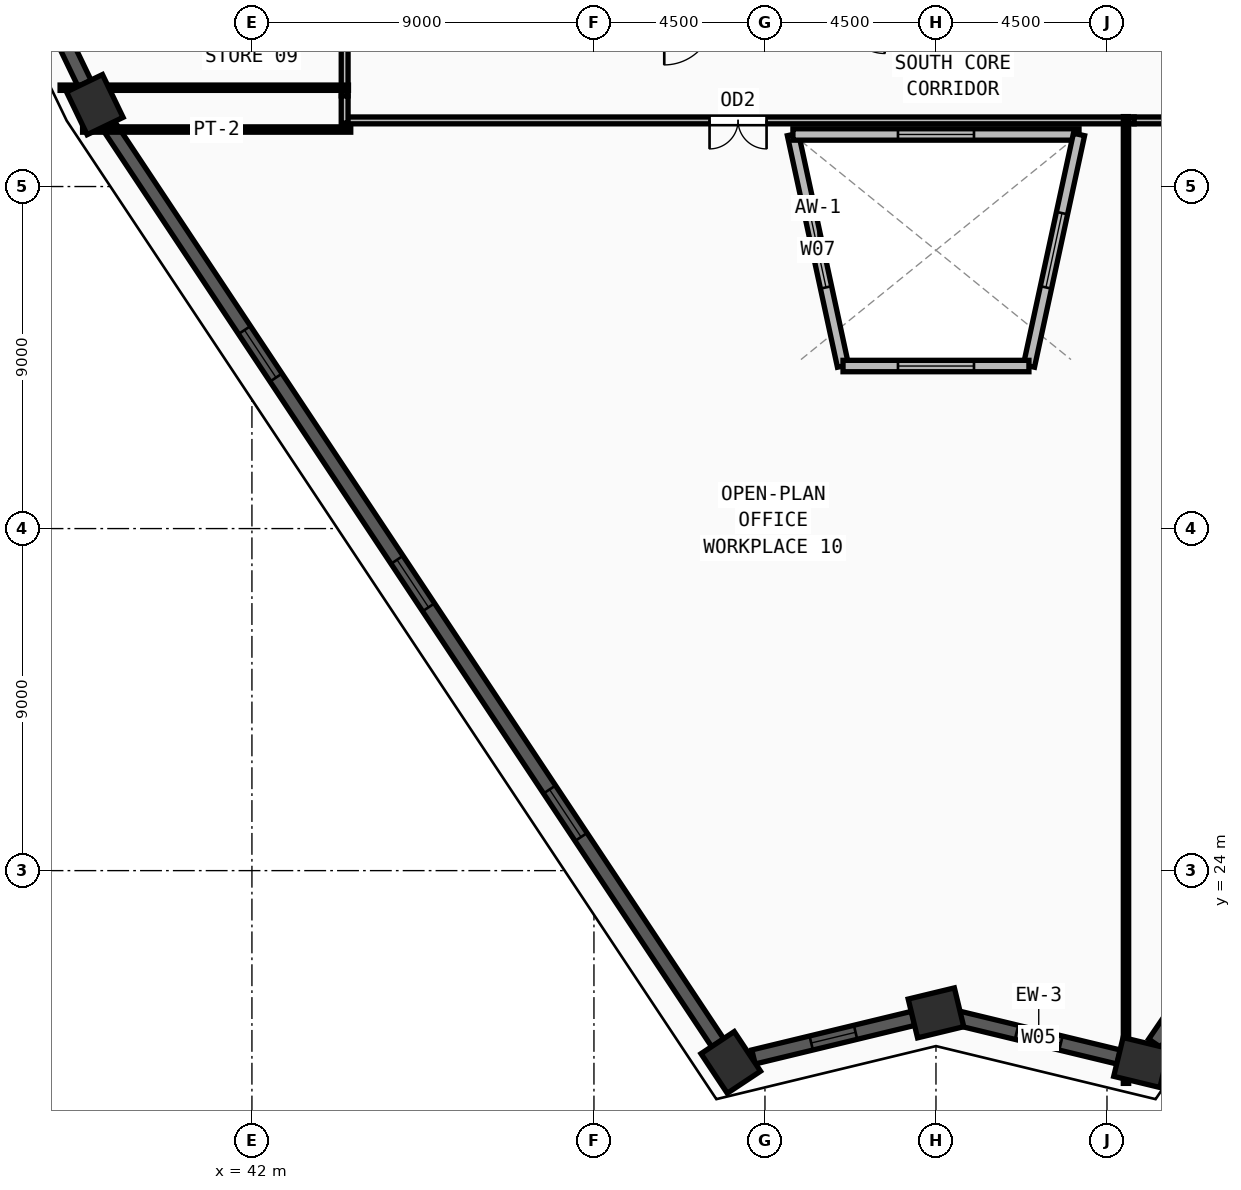
"""IFC4 building model, lengths in metres.
Left out: names, types, materials, properties, quantities, classifications, styles, units other than length and angle.
Written with IfcOpenShell. Run it as: python <this file> out.ifc"""

import sys

from ifc_helpers import new_model, si_unit, direction, frame, frame_2d, origin, origin_2d, place, context, subcontext, project, spatial, rectangle, extrude, source, transform, mapped, element, fill, save


model = new_model("IFC4")
c1 = context("Model", 3, precision=1e-05, world=origin(), true_north=direction((0.0, 1.0)))
c2 = subcontext(c1, "Body", "Model", "MODEL_VIEW")
j1 = project(units=[si_unit("LENGTHUNIT", "METRE"), si_unit("PLANEANGLEUNIT", "RADIAN")], contexts=[c1])
p1 = place(None, origin())
s1 = spatial("IfcSite", under=j1, at=p1, CompositionType="ELEMENT")
p2 = place(p1, origin())
s2 = spatial("IfcBuilding", under=s1, at=p2, CompositionType="ELEMENT")
p3 = place(p2, frame((0.0, 0.0, 224.25)))
s3 = spatial("IfcBuildingStorey", under=s2, at=p3, CompositionType="ELEMENT", Elevation=224.25)
m1 = source(origin(), c2, "Body", "SweptSolid", [
    extrude(rectangle(XDim=1.25, YDim=1.05, at=origin_2d()), origin(), (0.0, 0.0, 1.0), 3.75),
])
for number, where, z_axis, x_axis in (
    (1, (54.6, 18.953, 0.0), (0.0, 0.0, 1.0), (-0.553, 0.833, 0.0)),
    (2, (37.865, 44.155, 0.0), (0.0, 0.0, 1.0), (-0.434, 0.901, 0.0)),
    (3, (65.408, 18.951, 0.0), (0.0, 0.0, 1.0), (-0.972, 0.235, 0.0)),
    (4, (60.0, 20.257, 0.0), (0.0, 0.0, 1.0), (0.972, 0.235, 0.0)),
):
    element("IfcColumn", number, at=place(p3, frame(where, z_axis=z_axis, x_axis=x_axis)), inside=s3, PredefinedType="COLUMN", context=c2, shape_type="MappedRepresentation", body=[
        mapped(m1, transform((0.0, 0.0, 0.0), x_axis=(1.0, 0.0, 0.0), y_axis=(0.0, 1.0, 0.0), z_axis=(0.0, 0.0, 1.0), scale=1.0)),
    ])
p4 = place(p3, frame((60.598, 20.113, 0.0), z_axis=(0.0, 0.0, 1.0), x_axis=(0.972011709717, -0.234932407669, 0.0)))
e5 = element("IfcWall", 5, at=p4, inside=s3, PredefinedType="SOLIDWALL", context=c2, shape_type="SweptSolid", body=[
    extrude(rectangle(XDim=4.333, YDim=0.38, at=frame_2d((2.167, 0.0))), origin(), (0.0, 0.0, 1.0), 3.57),
])
m2 = source(origin(), c2, "Body", "SweptSolid", [
    extrude(rectangle(XDim=1.2, YDim=1.9, at=frame_2d((0.6, 0.95))), frame((0.0, 0.2, 0.0), z_axis=(0.0, -1.0, 0.0), x_axis=(1.0, 0.0, 0.0)), (0.0, 0.0, 1.0), 0.4),
])
p5 = place(p4, frame((1.567, 0.0, 0.55)))
e6 = element("IfcOpeningElement", 6, at=p5, cuts=e5, PredefinedType="OPENING", context=c2, shape_type="MappedRepresentation", body=[
    mapped(m2, transform((0.0, 0.0, 0.0), x_axis=(1.0, 0.0, 0.0), y_axis=(0.0, 1.0, 0.0), z_axis=(0.0, 0.0, 1.0), scale=1.0)),
])
p6 = place(p3, frame((65.754, 19.459, 0.0), z_axis=(0.0, 0.0, 1.0), x_axis=(0.563392494029, 0.826189383659, 0.0)))
e7 = element("IfcWall", 7, at=p6, inside=s3, PredefinedType="SOLIDWALL", context=c2, shape_type="SweptSolid", body=[
    extrude(rectangle(XDim=23.95, YDim=0.38, at=frame_2d((11.975, 0.0))), origin(), (0.0, 0.0, 1.0), 3.57),
])
m3 = source(origin(), c2, "Body", "SweptSolid", [
    extrude(rectangle(XDim=1.5, YDim=1.9, at=frame_2d((0.75, 0.95))), frame((0.0, 0.2, 0.0), z_axis=(0.0, -1.0, 0.0), x_axis=(1.0, 0.0, 0.0)), (0.0, 0.0, 1.0), 0.4),
])
p7 = place(p6, frame((5.237, 0.0, 0.55)))
e8 = element("IfcOpeningElement", 8, at=p7, cuts=e7, PredefinedType="OPENING", context=c2, shape_type="MappedRepresentation", body=[
    mapped(m3, transform((0.0, 0.0, 0.0), x_axis=(1.0, 0.0, 0.0), y_axis=(0.0, 1.0, 0.0), z_axis=(0.0, 0.0, 1.0), scale=1.0)),
])
p8 = place(p6, frame((11.225, 0.0, 0.55)))
e9 = element("IfcOpeningElement", 9, at=p8, cuts=e7, PredefinedType="OPENING", context=c2, shape_type="MappedRepresentation", body=[
    mapped(m3, transform((0.0, 0.0, 0.0), x_axis=(1.0, 0.0, 0.0), y_axis=(0.0, 1.0, 0.0), z_axis=(0.0, 0.0, 1.0), scale=1.0)),
])
p9 = place(p6, frame((17.212, 0.0, 0.55)))
e10 = element("IfcOpeningElement", 10, at=p9, cuts=e7, PredefinedType="OPENING", context=c2, shape_type="MappedRepresentation", body=[
    mapped(m3, transform((0.0, 0.0, 0.0), x_axis=(1.0, 0.0, 0.0), y_axis=(0.0, 1.0, 0.0), z_axis=(0.0, 0.0, 1.0), scale=1.0)),
])
p10 = place(p3, frame((27.211, 66.287, 0.0), z_axis=(0.0, 0.0, 1.0), x_axis=(0.433730710757, -0.901042546469, 0.0)))
e11 = element("IfcWall", 11, at=p10, inside=s3, PredefinedType="SOLIDWALL", context=c2, shape_type="SweptSolid", body=[
    extrude(rectangle(XDim=23.948, YDim=0.38, at=frame_2d((11.974, 0.0))), origin(), (0.0, 0.0, 1.0), 3.57),
])
p11 = place(p10, frame((5.237, 0.0, 0.55)))
e12 = element("IfcOpeningElement", 12, at=p11, cuts=e11, PredefinedType="OPENING", context=c2, shape_type="MappedRepresentation", body=[
    mapped(m3, transform((0.0, 0.0, 0.0), x_axis=(1.0, 0.0, 0.0), y_axis=(0.0, 1.0, 0.0), z_axis=(0.0, 0.0, 1.0), scale=1.0)),
])
p12 = place(p10, frame((11.224, 0.0, 0.55)))
e13 = element("IfcOpeningElement", 13, at=p12, cuts=e11, PredefinedType="OPENING", context=c2, shape_type="MappedRepresentation", body=[
    mapped(m3, transform((0.0, 0.0, 0.0), x_axis=(1.0, 0.0, 0.0), y_axis=(0.0, 1.0, 0.0), z_axis=(0.0, 0.0, 1.0), scale=1.0)),
])
p13 = place(p10, frame((15.011, 0.0, 0.55)))
e14 = element("IfcOpeningElement", 14, at=p13, cuts=e11, PredefinedType="OPENING", context=c2, shape_type="MappedRepresentation", body=[
    mapped(m3, transform((0.0, 0.0, 0.0), x_axis=(1.0, 0.0, 0.0), y_axis=(0.0, 1.0, 0.0), z_axis=(0.0, 0.0, 1.0), scale=1.0)),
])
p14 = place(p3, frame((38.205, 43.643, 0.0), z_axis=(0.0, 0.0, 1.0), x_axis=(0.553179293126, -0.83306222436, 0.0)))
e15 = element("IfcWall", 15, at=p14, inside=s3, PredefinedType="SOLIDWALL", context=c2, shape_type="SweptSolid", body=[
    extrude(rectangle(XDim=29.023, YDim=0.38, at=frame_2d((14.511, 0.0))), origin(), (0.0, 0.0, 1.0), 3.57),
])
p15 = place(p14, frame((6.506, 0.0, 0.55)))
e16 = element("IfcOpeningElement", 16, at=p15, cuts=e15, PredefinedType="OPENING", context=c2, shape_type="MappedRepresentation", body=[
    mapped(m3, transform((0.0, 0.0, 0.0), x_axis=(1.0, 0.0, 0.0), y_axis=(0.0, 1.0, 0.0), z_axis=(0.0, 0.0, 1.0), scale=1.0)),
])
p16 = place(p14, frame((13.762, 0.0, 0.55)))
e17 = element("IfcOpeningElement", 17, at=p16, cuts=e15, PredefinedType="OPENING", context=c2, shape_type="MappedRepresentation", body=[
    mapped(m3, transform((0.0, 0.0, 0.0), x_axis=(1.0, 0.0, 0.0), y_axis=(0.0, 1.0, 0.0), z_axis=(0.0, 0.0, 1.0), scale=1.0)),
])
p17 = place(p14, frame((21.017, 0.0, 0.55)))
e18 = element("IfcOpeningElement", 18, at=p17, cuts=e15, PredefinedType="OPENING", context=c2, shape_type="MappedRepresentation", body=[
    mapped(m3, transform((0.0, 0.0, 0.0), x_axis=(1.0, 0.0, 0.0), y_axis=(0.0, 1.0, 0.0), z_axis=(0.0, 0.0, 1.0), scale=1.0)),
])
p18 = place(p3, frame((55.198, 19.097, 0.0), z_axis=(0.0, 0.0, 1.0), x_axis=(0.972012019022, 0.234931127943, 0.0)))
e19 = element("IfcWall", 19, at=p18, inside=s3, PredefinedType="SOLIDWALL", context=c2, shape_type="SweptSolid", body=[
    extrude(rectangle(XDim=4.325, YDim=0.38, at=frame_2d((2.163, 0.0))), origin(), (0.0, 0.0, 1.0), 3.57),
])
p19 = place(p18, frame((1.563, 0.0, 0.55)))
e20 = element("IfcOpeningElement", 20, at=p19, cuts=e19, PredefinedType="OPENING", context=c2, shape_type="MappedRepresentation", body=[
    mapped(m2, transform((0.0, 0.0, 0.0), x_axis=(1.0, 0.0, 0.0), y_axis=(0.0, 1.0, 0.0), z_axis=(0.0, 0.0, 1.0), scale=1.0)),
])
p20 = place(p3, frame((57.554, 37.277, 0.0), z_axis=(0.0, 0.0, 1.0), x_axis=(-0.211403575635, 0.977398858301, 0.0)))
e21 = element("IfcWall", 21, at=p20, inside=s3, PredefinedType="SOLIDWALL", context=c2, shape_type="SweptSolid", body=[
    extrude(rectangle(XDim=6.234, YDim=0.3, at=frame_2d((3.117, 0.0))), origin(), (0.0, 0.0, 1.0), 3.57),
])
m4 = source(origin(), c2, "Body", "SweptSolid", [
    extrude(rectangle(XDim=2.0, YDim=1.9, at=frame_2d((1.0, 0.95))), frame((0.0, 0.16, 0.0), z_axis=(0.0, -1.0, 0.0), x_axis=(1.0, 0.0, 0.0)), (0.0, 0.0, 1.0), 0.32),
])
p21 = place(p20, frame((2.117, 0.0, 0.55)))
e22 = element("IfcOpeningElement", 22, at=p21, cuts=e21, PredefinedType="OPENING", context=c2, shape_type="MappedRepresentation", body=[
    mapped(m4, transform((0.0, 0.0, 0.0), x_axis=(1.0, 0.0, 0.0), y_axis=(0.0, 1.0, 0.0), z_axis=(0.0, 0.0, 1.0), scale=1.0)),
])
p22 = place(p3, frame((56.236, 43.37, 0.0), z_axis=(0.0, 0.0, 1.0), x_axis=(1.0, 0.0, 0.0)))
e23 = element("IfcWall", 23, at=p22, inside=s3, PredefinedType="SOLIDWALL", context=c2, shape_type="SweptSolid", body=[
    extrude(rectangle(XDim=7.528, YDim=0.3, at=frame_2d((3.764, 0.0))), origin(), (0.0, 0.0, 1.0), 3.57),
])
p23 = place(p22, frame((2.764, 0.0, 0.55)))
e24 = element("IfcOpeningElement", 24, at=p23, cuts=e23, PredefinedType="OPENING", context=c2, shape_type="MappedRepresentation", body=[
    mapped(m4, transform((0.0, 0.0, 0.0), x_axis=(1.0, 0.0, 0.0), y_axis=(0.0, 1.0, 0.0), z_axis=(0.0, 0.0, 1.0), scale=1.0)),
])
p24 = place(p3, frame((63.764, 43.37, 0.0), z_axis=(0.0, 0.0, 1.0), x_axis=(-0.211403575635, -0.977398858301, 0.0)))
e25 = element("IfcWall", 25, at=p24, inside=s3, PredefinedType="SOLIDWALL", context=c2, shape_type="SweptSolid", body=[
    extrude(rectangle(XDim=6.234, YDim=0.3, at=frame_2d((3.117, 0.0))), origin(), (0.0, 0.0, 1.0), 3.57),
])
p25 = place(p24, frame((2.117, 0.0, 0.55)))
e26 = element("IfcOpeningElement", 26, at=p25, cuts=e25, PredefinedType="OPENING", context=c2, shape_type="MappedRepresentation", body=[
    mapped(m4, transform((0.0, 0.0, 0.0), x_axis=(1.0, 0.0, 0.0), y_axis=(0.0, 1.0, 0.0), z_axis=(0.0, 0.0, 1.0), scale=1.0)),
])
p26 = place(p3, frame((62.446, 37.277, 0.0), z_axis=(0.0, 0.0, 1.0), x_axis=(-1.0, 0.0, 0.0)))
e27 = element("IfcWall", 27, at=p26, inside=s3, PredefinedType="SOLIDWALL", context=c2, shape_type="SweptSolid", body=[
    extrude(rectangle(XDim=4.892, YDim=0.3, at=frame_2d((2.446, 0.0))), origin(), (0.0, 0.0, 1.0), 3.57),
])
p27 = place(p26, frame((1.446, 0.0, 0.55)))
e28 = element("IfcOpeningElement", 28, at=p27, cuts=e27, PredefinedType="OPENING", context=c2, shape_type="MappedRepresentation", body=[
    mapped(m4, transform((0.0, 0.0, 0.0), x_axis=(1.0, 0.0, 0.0), y_axis=(0.0, 1.0, 0.0), z_axis=(0.0, 0.0, 1.0), scale=1.0)),
])
p28 = place(p3, frame((65.215, 43.74, 0.0), z_axis=(0.0, 0.0, 1.0), x_axis=(-1.0, 0.0, 0.0)))
e29 = element("IfcWall", 29, at=p28, inside=s3, PredefinedType="PARTITIONING", context=c2, shape_type="SweptSolid", body=[
    extrude(rectangle(XDim=20.845, YDim=0.18, at=frame_2d((10.422, 0.0))), origin(), (0.0, 0.0, 1.0), 3.57),
])
m5 = source(origin(), c2, "Body", "SweptSolid", [
    extrude(rectangle(XDim=1.5, YDim=2.2, at=frame_2d((0.75, 1.1))), frame((0.0, 0.1, 0.0), z_axis=(0.0, -1.0, 0.0), x_axis=(1.0, 0.0, 0.0)), (0.0, 0.0, 1.0), 0.2),
])
p29 = place(p28, frame((9.673, 0.0, 0.0)))
e30 = element("IfcOpeningElement", 30, at=p29, cuts=e29, PredefinedType="OPENING", context=c2, shape_type="MappedRepresentation", body=[
    mapped(m5, transform((0.0, 0.0, 0.0), x_axis=(1.0, 0.0, 0.0), y_axis=(0.0, 1.0, 0.0), z_axis=(0.0, 0.0, 1.0), scale=1.0)),
])
p30 = place(p3, frame((75.63, 43.74, 0.0), z_axis=(0.0, 0.0, 1.0), x_axis=(-1.0, 0.0, 0.0)))
e31 = element("IfcWall", 31, at=p30, inside=s3, PredefinedType="PARTITIONING", context=c2, shape_type="SweptSolid", body=[
    extrude(rectangle(XDim=10.415, YDim=0.18, at=frame_2d((5.208, 0.0))), origin(), (0.0, 0.0, 1.0), 3.57),
])
p31 = place(p30, frame((4.457, 0.0, 0.0)))
e32 = element("IfcOpeningElement", 32, at=p31, cuts=e31, PredefinedType="OPENING", context=c2, shape_type="MappedRepresentation", body=[
    mapped(m5, transform((0.0, 0.0, 0.0), x_axis=(1.0, 0.0, 0.0), y_axis=(0.0, 1.0, 0.0), z_axis=(0.0, 0.0, 1.0), scale=1.0)),
])
p32 = place(p3, frame((44.44, 44.385, 0.0), z_axis=(0.0, 0.0, 1.0), x_axis=(0.0, 1.0, 0.0)))
e33 = element("IfcWall", 33, at=p32, inside=s3, PredefinedType="PARTITIONING", context=c2, shape_type="SweptSolid", body=[
    extrude(rectangle(XDim=3.825, YDim=0.18, at=frame_2d((1.913, 0.0))), origin(), (0.0, 0.0, 1.0), 3.57),
])
p33 = place(p3, frame((44.44, 43.67, 0.0), z_axis=(0.0, 0.0, 1.0), x_axis=(0.0, 1.0, 0.0)))
e34 = element("IfcWall", 34, at=p33, inside=s3, PredefinedType="PARTITIONING", context=c2, shape_type="SweptSolid", body=[
    extrude(rectangle(XDim=0.715, YDim=0.18, at=frame_2d((0.357, 0.0))), origin(), (0.0, 0.0, 1.0), 3.57),
])
p34 = place(p3, frame((44.6, 43.5, 0.0), z_axis=(0.0, 0.0, 1.0), x_axis=(-1.0, 0.0, 0.0)))
e35 = element("IfcWall", 35, at=p34, inside=s3, PredefinedType="PARTITIONING", context=c2, shape_type="SweptSolid", body=[
    extrude(rectangle(XDim=7.056, YDim=0.14, at=frame_2d((3.528, 0.0))), origin(), (0.0, 0.0, 1.0), 3.57),
])
p35 = place(p3, frame((44.54, 44.6, 0.0), z_axis=(0.0, 0.0, 1.0), x_axis=(-1.0, 0.0, 0.0)))
e36 = element("IfcWall", 36, at=p35, inside=s3, PredefinedType="PARTITIONING", context=c2, shape_type="SweptSolid", body=[
    extrude(rectangle(XDim=7.588, YDim=0.14, at=frame_2d((3.794, 0.0))), origin(), (0.0, 0.0, 1.0), 3.57),
])
p36 = place(p3, frame((65.0, 43.84, 0.0), z_axis=(0.0, 0.0, 1.0), x_axis=(0.0, -1.0, 0.0)))
e37 = element("IfcWall", 37, at=p36, inside=s3, PredefinedType="PARTITIONING", context=c2, shape_type="SweptSolid", body=[
    extrude(rectangle(XDim=25.438, YDim=0.14, at=frame_2d((12.719, 0.0))), origin(), (0.0, 0.0, 1.0), 3.57),
])
m6 = source(origin(), c2, "Body", "SweptSolid", [
    extrude(rectangle(XDim=1.2, YDim=1.9, at=frame_2d((0.6, 0.95))), frame((0.0, 0.03, 0.0), z_axis=(0.0, -1.0, 0.0), x_axis=(1.0, 0.0, 0.0)), (0.0, 0.0, 1.0), 0.06),
])
p37 = place(p5, origin())
e38 = element("IfcWindow", 38, at=p37, inside=s3, PartitioningType="SINGLE_PANEL", PredefinedType="WINDOW", context=c2, shape_type="MappedRepresentation", body=[
    mapped(m6, transform((0.0, 0.0, 0.0), x_axis=(1.0, 0.0, 0.0), y_axis=(0.0, 1.0, 0.0), z_axis=(0.0, 0.0, 1.0), scale=1.0)),
])
fill(e6, e38)
m7 = source(origin(), c2, "Body", "SweptSolid", [
    extrude(rectangle(XDim=1.5, YDim=1.9, at=frame_2d((0.75, 0.95))), frame((0.0, 0.03, 0.0), z_axis=(0.0, -1.0, 0.0), x_axis=(1.0, 0.0, 0.0)), (0.0, 0.0, 1.0), 0.06),
])
p38 = place(p15, origin())
e39 = element("IfcWindow", 39, at=p38, inside=s3, PartitioningType="DOUBLE_PANEL_VERTICAL", PredefinedType="WINDOW", context=c2, shape_type="MappedRepresentation", body=[
    mapped(m7, transform((0.0, 0.0, 0.0), x_axis=(1.0, 0.0, 0.0), y_axis=(0.0, 1.0, 0.0), z_axis=(0.0, 0.0, 1.0), scale=1.0)),
])
fill(e16, e39)
p39 = place(p16, origin())
e40 = element("IfcWindow", 40, at=p39, inside=s3, PartitioningType="DOUBLE_PANEL_VERTICAL", PredefinedType="WINDOW", context=c2, shape_type="MappedRepresentation", body=[
    mapped(m7, transform((0.0, 0.0, 0.0), x_axis=(1.0, 0.0, 0.0), y_axis=(0.0, 1.0, 0.0), z_axis=(0.0, 0.0, 1.0), scale=1.0)),
])
fill(e17, e40)
p40 = place(p17, origin())
e41 = element("IfcWindow", 41, at=p40, inside=s3, PartitioningType="DOUBLE_PANEL_VERTICAL", PredefinedType="WINDOW", context=c2, shape_type="MappedRepresentation", body=[
    mapped(m7, transform((0.0, 0.0, 0.0), x_axis=(1.0, 0.0, 0.0), y_axis=(0.0, 1.0, 0.0), z_axis=(0.0, 0.0, 1.0), scale=1.0)),
])
fill(e18, e41)
p41 = place(p19, origin())
e42 = element("IfcWindow", 42, at=p41, inside=s3, PartitioningType="SINGLE_PANEL", PredefinedType="WINDOW", context=c2, shape_type="MappedRepresentation", body=[
    mapped(m6, transform((0.0, 0.0, 0.0), x_axis=(1.0, 0.0, 0.0), y_axis=(0.0, 1.0, 0.0), z_axis=(0.0, 0.0, 1.0), scale=1.0)),
])
fill(e20, e42)
m8 = source(origin(), c2, "Body", "SweptSolid", [
    extrude(rectangle(XDim=2.0, YDim=1.9, at=frame_2d((1.0, 0.95))), frame((0.0, 0.03, 0.0), z_axis=(0.0, -1.0, 0.0), x_axis=(1.0, 0.0, 0.0)), (0.0, 0.0, 1.0), 0.06),
])
p42 = place(p21, origin())
e43 = element("IfcWindow", 43, at=p42, inside=s3, PartitioningType="DOUBLE_PANEL_VERTICAL", PredefinedType="WINDOW", context=c2, shape_type="MappedRepresentation", body=[
    mapped(m8, transform((0.0, 0.0, 0.0), x_axis=(1.0, 0.0, 0.0), y_axis=(0.0, 1.0, 0.0), z_axis=(0.0, 0.0, 1.0), scale=1.0)),
])
fill(e22, e43)
p43 = place(p23, origin())
e44 = element("IfcWindow", 44, at=p43, inside=s3, PartitioningType="DOUBLE_PANEL_VERTICAL", PredefinedType="WINDOW", context=c2, shape_type="MappedRepresentation", body=[
    mapped(m8, transform((0.0, 0.0, 0.0), x_axis=(1.0, 0.0, 0.0), y_axis=(0.0, 1.0, 0.0), z_axis=(0.0, 0.0, 1.0), scale=1.0)),
])
fill(e24, e44)
p44 = place(p25, origin())
e45 = element("IfcWindow", 45, at=p44, inside=s3, PartitioningType="DOUBLE_PANEL_VERTICAL", PredefinedType="WINDOW", context=c2, shape_type="MappedRepresentation", body=[
    mapped(m8, transform((0.0, 0.0, 0.0), x_axis=(1.0, 0.0, 0.0), y_axis=(0.0, 1.0, 0.0), z_axis=(0.0, 0.0, 1.0), scale=1.0)),
])
fill(e26, e45)
p45 = place(p27, origin())
e46 = element("IfcWindow", 46, at=p45, inside=s3, PartitioningType="DOUBLE_PANEL_VERTICAL", PredefinedType="WINDOW", context=c2, shape_type="MappedRepresentation", body=[
    mapped(m8, transform((0.0, 0.0, 0.0), x_axis=(1.0, 0.0, 0.0), y_axis=(0.0, 1.0, 0.0), z_axis=(0.0, 0.0, 1.0), scale=1.0)),
])
fill(e28, e46)
m9 = source(origin(), c2, "Body", "SweptSolid", [
    extrude(rectangle(XDim=1.5, YDim=2.2, at=frame_2d((0.75, 1.1))), frame((0.0, 0.025, 0.0), z_axis=(0.0, -1.0, 0.0), x_axis=(1.0, 0.0, 0.0)), (0.0, 0.0, 1.0), 0.05),
])
p46 = place(p29, origin())
e47 = element("IfcDoor", 47, at=p46, inside=s3, OperationType="DOUBLE_DOOR_SINGLE_SWING", PredefinedType="DOOR", context=c2, shape_type="MappedRepresentation", body=[
    mapped(m9, transform((0.0, 0.0, 0.0), x_axis=(1.0, 0.0, 0.0), y_axis=(0.0, 1.0, 0.0), z_axis=(0.0, 0.0, 1.0), scale=1.0)),
])
fill(e30, e47)
save(model, sys.argv[1])
